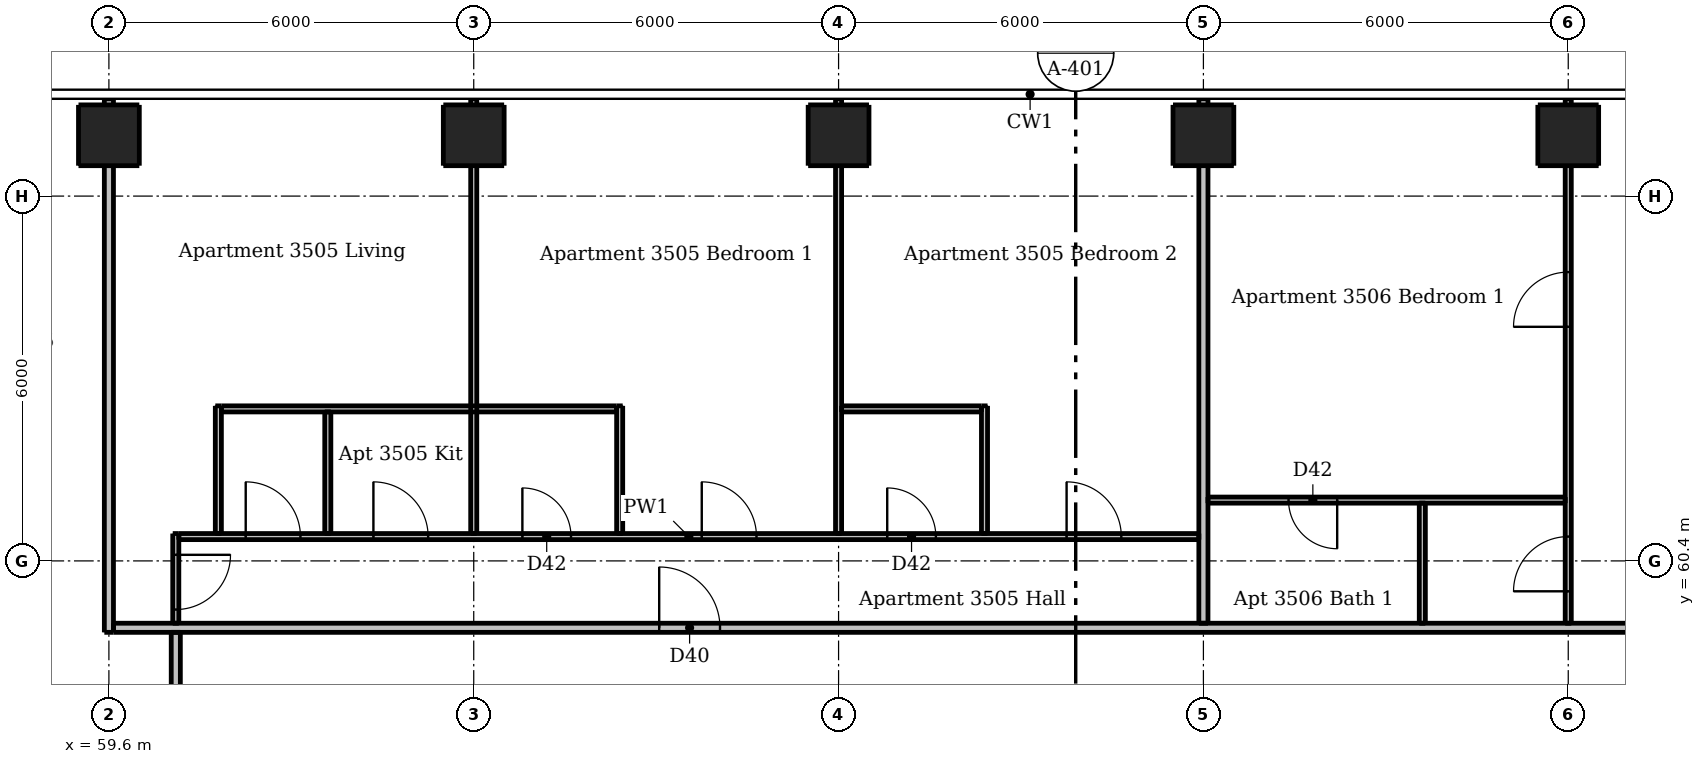
"""IFC4 building model, lengths in metres.
Left out: names, types, materials, properties, quantities, classifications, styles, units other than length and angle.
Written with IfcOpenShell. Run it as: python <this file> out.ifc"""

import sys

from ifc_helpers import new_model, si_unit, direction, frame, frame_2d, origin, origin_2d, place, context, subcontext, project, spatial, rectangle, extrude, element, fill, save


model = new_model("IFC4")
c1 = context("Model", 3, precision=1e-05, world=origin(), true_north=direction((0.0, 1.0)))
c2 = subcontext(c1, "Body", "Model", "MODEL_VIEW")
j1 = project(units=[si_unit("LENGTHUNIT", "METRE"), si_unit("PLANEANGLEUNIT", "RADIAN")], contexts=[c1])
p1 = place(None, origin())
s1 = spatial("IfcSite", under=j1, at=p1, CompositionType="ELEMENT")
p2 = place(p1, origin())
s2 = spatial("IfcBuilding", under=s1, at=p2, CompositionType="ELEMENT")
p3 = place(p2, frame((0.0, 0.0, 133.9)))
s3 = spatial("IfcBuildingStorey", under=s2, at=p3, CompositionType="ELEMENT", Elevation=133.9)
for number, where, z_axis, x_axis in (
    (1, (59.6, 67.4, 0.0), (0.0, 0.0, 1.0), (1.0, 0.0, 0.0)),
    (2, (65.6, 67.4, 0.0), (0.0, 0.0, 1.0), (1.0, 0.0, 0.0)),
    (3, (71.6, 67.4, 0.0), (0.0, 0.0, 1.0), (1.0, 0.0, 0.0)),
    (4, (77.6, 67.4, 0.0), (0.0, 0.0, 1.0), (1.0, 0.0, 0.0)),
    (5, (83.6, 67.4, 0.0), (0.0, 0.0, 1.0), (1.0, 0.0, 0.0)),
):
    element("IfcColumn", number, at=place(p3, frame(where, z_axis=z_axis, x_axis=x_axis)), inside=s3, PredefinedType="COLUMN", context=c2, shape_type="SweptSolid", body=[
        extrude(rectangle(XDim=1.0, YDim=1.0, at=origin_2d()), origin(), (0.0, 0.0, 1.0), 3.05),
    ])
p4 = place(p3, frame((60.7, 60.85, 0.0), z_axis=(0.0, 0.0, 1.0), x_axis=(0.0, -1.0, 0.0)))
e6 = element("IfcWall", 6, at=p4, inside=s3, PredefinedType="PARTITIONING", context=c2, shape_type="SweptSolid", body=[
    extrude(rectangle(XDim=1.475, YDim=0.1, at=frame_2d((0.738, 0.0))), origin(), (0.0, 0.0, 1.0), 3.05),
])
p5 = place(p4, frame((0.35, 0.0, 0.0)))
e7 = element("IfcOpeningElement", 7, at=p5, cuts=e6, PredefinedType="OPENING", context=c2, shape_type="SweptSolid", body=[
    extrude(rectangle(XDim=0.9, YDim=2.1, at=frame_2d((0.45, 1.05))), frame((0.0, 0.06, 0.0), z_axis=(0.0, -1.0, 0.0), x_axis=(1.0, 0.0, 0.0)), (0.0, 0.0, 1.0), 0.12),
])
p6 = place(p3, frame((61.4, 60.85, 0.0), z_axis=(0.0, 0.0, 1.0), x_axis=(0.0, 1.0, 0.0)))
e8 = element("IfcWall", 8, at=p6, inside=s3, PredefinedType="PARTITIONING", context=c2, shape_type="SweptSolid", body=[
    extrude(rectangle(XDim=2.1, YDim=0.1, at=frame_2d((1.05, 0.0))), origin(), (0.0, 0.0, 1.0), 3.05),
])
p7 = place(p3, frame((63.2, 60.85, 0.0), z_axis=(0.0, 0.0, 1.0), x_axis=(0.0, 1.0, 0.0)))
e9 = element("IfcWall", 9, at=p7, inside=s3, PredefinedType="PARTITIONING", context=c2, shape_type="SweptSolid", body=[
    extrude(rectangle(XDim=2.0, YDim=0.1, at=frame_2d((1.0, 0.0))), origin(), (0.0, 0.0, 1.0), 3.05),
])
p8 = place(p3, frame((65.6, 60.85, 0.0), z_axis=(0.0, 0.0, 1.0), x_axis=(0.0, 1.0, 0.0)))
e10 = element("IfcWall", 10, at=p8, inside=s3, PredefinedType="PARTITIONING", context=c2, shape_type="SweptSolid", body=[
    extrude(rectangle(XDim=7.15, YDim=0.1, at=frame_2d((3.575, 0.0))), origin(), (0.0, 0.0, 1.0), 2.516),
])
p9 = place(p3, frame((68.0, 60.85, 0.0), z_axis=(0.0, 0.0, 1.0), x_axis=(0.0, 1.0, 0.0)))
e11 = element("IfcWall", 11, at=p9, inside=s3, PredefinedType="PARTITIONING", context=c2, shape_type="SweptSolid", body=[
    extrude(rectangle(XDim=2.1, YDim=0.1, at=frame_2d((1.05, 0.0))), origin(), (0.0, 0.0, 1.0), 3.05),
])
p10 = place(p3, frame((71.6, 60.85, 0.0), z_axis=(0.0, 0.0, 1.0), x_axis=(0.0, 1.0, 0.0)))
e12 = element("IfcWall", 12, at=p10, inside=s3, PredefinedType="PARTITIONING", context=c2, shape_type="SweptSolid", body=[
    extrude(rectangle(XDim=7.15, YDim=0.1, at=frame_2d((3.575, 0.0))), origin(), (0.0, 0.0, 1.0), 2.516),
])
p11 = place(p3, frame((74.0, 60.85, 0.0), z_axis=(0.0, 0.0, 1.0), x_axis=(0.0, 1.0, 0.0)))
e13 = element("IfcWall", 13, at=p11, inside=s3, PredefinedType="PARTITIONING", context=c2, shape_type="SweptSolid", body=[
    extrude(rectangle(XDim=2.1, YDim=0.1, at=frame_2d((1.05, 0.0))), origin(), (0.0, 0.0, 1.0), 3.05),
])
p12 = place(p3, frame((81.2, 59.375, 0.0), z_axis=(0.0, 0.0, 1.0), x_axis=(0.0, 1.0, 0.0)))
e14 = element("IfcWall", 14, at=p12, inside=s3, PredefinedType="PARTITIONING", context=c2, shape_type="SweptSolid", body=[
    extrude(rectangle(XDim=1.975, YDim=0.1, at=frame_2d((0.988, 0.0))), origin(), (0.0, 0.0, 1.0), 3.05),
])
p13 = place(p3, frame((83.6, 59.375, 0.0), z_axis=(0.0, 0.0, 1.0), x_axis=(0.0, 1.0, 0.0)))
e15 = element("IfcWall", 15, at=p13, inside=s3, PredefinedType="PARTITIONING", context=c2, shape_type="SweptSolid", body=[
    extrude(rectangle(XDim=8.625, YDim=0.1, at=frame_2d((4.312, 0.0))), origin(), (0.0, 0.0, 1.0), 2.516),
])
p14 = place(p13, frame((0.525, 0.0, 0.0)))
e16 = element("IfcOpeningElement", 16, at=p14, cuts=e15, PredefinedType="OPENING", context=c2, shape_type="SweptSolid", body=[
    extrude(rectangle(XDim=0.9, YDim=2.1, at=frame_2d((0.45, 1.05))), frame((0.0, 0.06, 0.0), z_axis=(0.0, -1.0, 0.0), x_axis=(1.0, 0.0, 0.0)), (0.0, 0.0, 1.0), 0.12),
])
p15 = place(p13, frame((4.875, 0.0, 0.0)))
e17 = element("IfcOpeningElement", 17, at=p15, cuts=e15, PredefinedType="OPENING", context=c2, shape_type="SweptSolid", body=[
    extrude(rectangle(XDim=0.9, YDim=2.1, at=frame_2d((0.45, 1.05))), frame((0.0, 0.06, 0.0), z_axis=(0.0, -1.0, 0.0), x_axis=(1.0, 0.0, 0.0)), (0.0, 0.0, 1.0), 0.12),
])
p16 = place(p3, frame((61.45, 62.9, 0.0), z_axis=(0.0, 0.0, 1.0), x_axis=(1.0, 0.0, 0.0)))
e18 = element("IfcWall", 18, at=p16, inside=s3, PredefinedType="PARTITIONING", context=c2, shape_type="SweptSolid", body=[
    extrude(rectangle(XDim=6.5, YDim=0.1, at=frame_2d((3.25, 0.0))), origin(), (0.0, 0.0, 1.0), 3.05),
])
p17 = place(p3, frame((71.65, 62.9, 0.0), z_axis=(0.0, 0.0, 1.0), x_axis=(1.0, 0.0, 0.0)))
e19 = element("IfcWall", 19, at=p17, inside=s3, PredefinedType="PARTITIONING", context=c2, shape_type="SweptSolid", body=[
    extrude(rectangle(XDim=2.3, YDim=0.1, at=frame_2d((1.15, 0.0))), origin(), (0.0, 0.0, 1.0), 3.05),
])
p18 = place(p3, frame((83.55, 61.4, 0.0), z_axis=(0.0, 0.0, 1.0), x_axis=(-1.0, 0.0, 0.0)))
e20 = element("IfcWall", 20, at=p18, inside=s3, PredefinedType="PARTITIONING", context=c2, shape_type="SweptSolid", body=[
    extrude(rectangle(XDim=5.875, YDim=0.1, at=frame_2d((2.938, 0.0))), origin(), (0.0, 0.0, 1.0), 3.05),
])
p19 = place(p18, frame((3.75, 0.0, 0.0)))
e21 = element("IfcOpeningElement", 21, at=p19, cuts=e20, PredefinedType="OPENING", context=c2, shape_type="SweptSolid", body=[
    extrude(rectangle(XDim=0.8, YDim=2.1, at=frame_2d((0.4, 1.05))), frame((0.0, 0.06, 0.0), z_axis=(0.0, -1.0, 0.0), x_axis=(1.0, 0.0, 0.0)), (0.0, 0.0, 1.0), 0.12),
])
p20 = place(p3, frame((60.75, 60.8, 0.0), z_axis=(0.0, 0.0, 1.0), x_axis=(1.0, 0.0, 0.0)))
e22 = element("IfcWall", 22, at=p20, inside=s3, PredefinedType="PARTITIONING", context=c2, shape_type="SweptSolid", body=[
    extrude(rectangle(XDim=16.775, YDim=0.1, at=frame_2d((8.387, 0.0))), origin(), (0.0, 0.0, 1.0), 3.05),
])
p21 = place(p20, frame((3.2, 0.0, 0.0)))
e23 = element("IfcOpeningElement", 23, at=p21, cuts=e22, PredefinedType="OPENING", context=c2, shape_type="SweptSolid", body=[
    extrude(rectangle(XDim=0.9, YDim=2.1, at=frame_2d((0.45, 1.05))), frame((0.0, 0.06, 0.0), z_axis=(0.0, -1.0, 0.0), x_axis=(1.0, 0.0, 0.0)), (0.0, 0.0, 1.0), 0.12),
])
p22 = place(p20, frame((1.1, 0.0, 0.0)))
e24 = element("IfcOpeningElement", 24, at=p22, cuts=e22, PredefinedType="OPENING", context=c2, shape_type="SweptSolid", body=[
    extrude(rectangle(XDim=0.9, YDim=2.1, at=frame_2d((0.45, 1.05))), frame((0.0, 0.06, 0.0), z_axis=(0.0, -1.0, 0.0), x_axis=(1.0, 0.0, 0.0)), (0.0, 0.0, 1.0), 0.12),
])
p23 = place(p20, frame((8.6, 0.0, 0.0)))
e25 = element("IfcOpeningElement", 25, at=p23, cuts=e22, PredefinedType="OPENING", context=c2, shape_type="SweptSolid", body=[
    extrude(rectangle(XDim=0.9, YDim=2.1, at=frame_2d((0.45, 1.05))), frame((0.0, 0.06, 0.0), z_axis=(0.0, -1.0, 0.0), x_axis=(1.0, 0.0, 0.0)), (0.0, 0.0, 1.0), 0.12),
])
p24 = place(p20, frame((14.6, 0.0, 0.0)))
e26 = element("IfcOpeningElement", 26, at=p24, cuts=e22, PredefinedType="OPENING", context=c2, shape_type="SweptSolid", body=[
    extrude(rectangle(XDim=0.9, YDim=2.1, at=frame_2d((0.45, 1.05))), frame((0.0, 0.06, 0.0), z_axis=(0.0, -1.0, 0.0), x_axis=(1.0, 0.0, 0.0)), (0.0, 0.0, 1.0), 0.12),
])
p25 = place(p20, frame((5.65, 0.0, 0.0)))
e27 = element("IfcOpeningElement", 27, at=p25, cuts=e22, PredefinedType="OPENING", context=c2, shape_type="SweptSolid", body=[
    extrude(rectangle(XDim=0.8, YDim=2.1, at=frame_2d((0.4, 1.05))), frame((0.0, 0.06, 0.0), z_axis=(0.0, -1.0, 0.0), x_axis=(1.0, 0.0, 0.0)), (0.0, 0.0, 1.0), 0.12),
])
p26 = place(p20, frame((11.65, 0.0, 0.0)))
e28 = element("IfcOpeningElement", 28, at=p26, cuts=e22, PredefinedType="OPENING", context=c2, shape_type="SweptSolid", body=[
    extrude(rectangle(XDim=0.8, YDim=2.1, at=frame_2d((0.4, 1.05))), frame((0.0, 0.06, 0.0), z_axis=(0.0, -1.0, 0.0), x_axis=(1.0, 0.0, 0.0)), (0.0, 0.0, 1.0), 0.12),
])
p27 = place(p3, frame((59.6, 59.225, 0.0), z_axis=(0.0, 0.0, 1.0), x_axis=(0.0, 1.0, 0.0)))
e29 = element("IfcWall", 29, at=p27, inside=s3, PredefinedType="PARTITIONING", context=c2, shape_type="SweptSolid", body=[
    extrude(rectangle(XDim=8.775, YDim=0.15, at=frame_2d((4.387, 0.0))), origin(), (0.0, 0.0, 1.0), 2.51),
])
p28 = place(p3, frame((60.7, 30.325, 0.0), z_axis=(0.0, 0.0, 1.0), x_axis=(0.0, 1.0, 0.0)))
e30 = element("IfcWall", 30, at=p28, inside=s3, PredefinedType="PARTITIONING", context=c2, shape_type="SweptSolid", body=[
    extrude(rectangle(XDim=28.9, YDim=0.15, at=frame_2d((14.45, 0.0))), origin(), (0.0, 0.0, 1.0), 3.05),
])
p29 = place(p28, frame((9.225, 0.0, 0.0)))
e31 = element("IfcOpeningElement", 31, at=p29, cuts=e30, PredefinedType="OPENING", context=c2, shape_type="SweptSolid", body=[
    extrude(rectangle(XDim=1.0, YDim=2.1, at=frame_2d((0.5, 1.05))), frame((0.0, 0.085, 0.0), z_axis=(0.0, -1.0, 0.0), x_axis=(1.0, 0.0, 0.0)), (0.0, 0.0, 1.0), 0.17),
])
p30 = place(p28, frame((26.025, 0.0, 0.0)))
e32 = element("IfcOpeningElement", 32, at=p30, cuts=e30, PredefinedType="OPENING", context=c2, shape_type="SweptSolid", body=[
    extrude(rectangle(XDim=1.0, YDim=2.1, at=frame_2d((0.5, 1.05))), frame((0.0, 0.085, 0.0), z_axis=(0.0, -1.0, 0.0), x_axis=(1.0, 0.0, 0.0)), (0.0, 0.0, 1.0), 0.17),
])
p31 = place(p3, frame((77.6, 59.375, 0.0), z_axis=(0.0, 0.0, 1.0), x_axis=(0.0, 1.0, 0.0)))
e33 = element("IfcWall", 33, at=p31, inside=s3, PredefinedType="PARTITIONING", context=c2, shape_type="SweptSolid", body=[
    extrude(rectangle(XDim=8.625, YDim=0.15, at=frame_2d((4.312, 0.0))), origin(), (0.0, 0.0, 1.0), 2.516),
])
p32 = place(p3, frame((59.675, 59.3, 0.0), z_axis=(0.0, 0.0, 1.0), x_axis=(1.0, 0.0, 0.0)))
e34 = element("IfcWall", 34, at=p32, inside=s3, PredefinedType="PARTITIONING", context=c2, shape_type="SweptSolid", body=[
    extrude(rectangle(XDim=28.55, YDim=0.15, at=frame_2d((14.275, 0.0))), origin(), (0.0, 0.0, 1.0), 3.05),
])
p33 = place(p32, frame((8.975, 0.0, 0.0)))
e35 = element("IfcOpeningElement", 35, at=p33, cuts=e34, PredefinedType="OPENING", context=c2, shape_type="SweptSolid", body=[
    extrude(rectangle(XDim=1.0, YDim=2.1, at=frame_2d((0.5, 1.05))), frame((0.0, 0.085, 0.0), z_axis=(0.0, -1.0, 0.0), x_axis=(1.0, 0.0, 0.0)), (0.0, 0.0, 1.0), 0.17),
])
p34 = place(p32, frame((25.775, 0.0, 0.0)))
e36 = element("IfcOpeningElement", 36, at=p34, cuts=e34, PredefinedType="OPENING", context=c2, shape_type="SweptSolid", body=[
    extrude(rectangle(XDim=1.0, YDim=2.1, at=frame_2d((0.5, 1.05))), frame((0.0, 0.085, 0.0), z_axis=(0.0, -1.0, 0.0), x_axis=(1.0, 0.0, 0.0)), (0.0, 0.0, 1.0), 0.17),
])
p35 = place(p33, origin())
e37 = element("IfcDoor", 37, at=p35, inside=s3, OperationType="SINGLE_SWING_LEFT", PredefinedType="DOOR", context=c2, shape_type="SweptSolid", body=[
    extrude(rectangle(XDim=1.0, YDim=2.1, at=frame_2d((0.5, 1.05))), frame((0.0, 0.025, 0.0), z_axis=(0.0, -1.0, 0.0), x_axis=(1.0, 0.0, 0.0)), (0.0, 0.0, 1.0), 0.05),
])
fill(e35, e37)
p36 = place(p5, origin())
e38 = element("IfcDoor", 38, at=p36, inside=s3, OperationType="SINGLE_SWING_LEFT", PredefinedType="DOOR", context=c2, shape_type="SweptSolid", body=[
    extrude(rectangle(XDim=0.9, YDim=2.1, at=frame_2d((0.45, 1.05))), frame((0.0, 0.025, 0.0), z_axis=(0.0, -1.0, 0.0), x_axis=(1.0, 0.0, 0.0)), (0.0, 0.0, 1.0), 0.05),
])
fill(e7, e38)
p37 = place(p21, origin())
e39 = element("IfcDoor", 39, at=p37, inside=s3, OperationType="SINGLE_SWING_LEFT", PredefinedType="DOOR", context=c2, shape_type="SweptSolid", body=[
    extrude(rectangle(XDim=0.9, YDim=2.1, at=frame_2d((0.45, 1.05))), frame((0.0, 0.025, 0.0), z_axis=(0.0, -1.0, 0.0), x_axis=(1.0, 0.0, 0.0)), (0.0, 0.0, 1.0), 0.05),
])
fill(e23, e39)
p38 = place(p22, origin())
e40 = element("IfcDoor", 40, at=p38, inside=s3, OperationType="SINGLE_SWING_LEFT", PredefinedType="DOOR", context=c2, shape_type="SweptSolid", body=[
    extrude(rectangle(XDim=0.9, YDim=2.1, at=frame_2d((0.45, 1.05))), frame((0.0, 0.025, 0.0), z_axis=(0.0, -1.0, 0.0), x_axis=(1.0, 0.0, 0.0)), (0.0, 0.0, 1.0), 0.05),
])
fill(e24, e40)
p39 = place(p23, origin())
e41 = element("IfcDoor", 41, at=p39, inside=s3, OperationType="SINGLE_SWING_LEFT", PredefinedType="DOOR", context=c2, shape_type="SweptSolid", body=[
    extrude(rectangle(XDim=0.9, YDim=2.1, at=frame_2d((0.45, 1.05))), frame((0.0, 0.025, 0.0), z_axis=(0.0, -1.0, 0.0), x_axis=(1.0, 0.0, 0.0)), (0.0, 0.0, 1.0), 0.05),
])
fill(e25, e41)
p40 = place(p24, origin())
e42 = element("IfcDoor", 42, at=p40, inside=s3, OperationType="SINGLE_SWING_LEFT", PredefinedType="DOOR", context=c2, shape_type="SweptSolid", body=[
    extrude(rectangle(XDim=0.9, YDim=2.1, at=frame_2d((0.45, 1.05))), frame((0.0, 0.025, 0.0), z_axis=(0.0, -1.0, 0.0), x_axis=(1.0, 0.0, 0.0)), (0.0, 0.0, 1.0), 0.05),
])
fill(e26, e42)
p41 = place(p25, origin())
e43 = element("IfcDoor", 43, at=p41, inside=s3, OperationType="SINGLE_SWING_LEFT", PredefinedType="DOOR", context=c2, shape_type="SweptSolid", body=[
    extrude(rectangle(XDim=0.8, YDim=2.1, at=frame_2d((0.4, 1.05))), frame((0.0, 0.025, 0.0), z_axis=(0.0, -1.0, 0.0), x_axis=(1.0, 0.0, 0.0)), (0.0, 0.0, 1.0), 0.05),
])
fill(e27, e43)
p42 = place(p26, origin())
e44 = element("IfcDoor", 44, at=p42, inside=s3, OperationType="SINGLE_SWING_LEFT", PredefinedType="DOOR", context=c2, shape_type="SweptSolid", body=[
    extrude(rectangle(XDim=0.8, YDim=2.1, at=frame_2d((0.4, 1.05))), frame((0.0, 0.025, 0.0), z_axis=(0.0, -1.0, 0.0), x_axis=(1.0, 0.0, 0.0)), (0.0, 0.0, 1.0), 0.05),
])
fill(e28, e44)
p43 = place(p14, origin())
e45 = element("IfcDoor", 45, at=p43, inside=s3, OperationType="SINGLE_SWING_LEFT", PredefinedType="DOOR", context=c2, shape_type="SweptSolid", body=[
    extrude(rectangle(XDim=0.9, YDim=2.1, at=frame_2d((0.45, 1.05))), frame((0.0, 0.025, 0.0), z_axis=(0.0, -1.0, 0.0), x_axis=(1.0, 0.0, 0.0)), (0.0, 0.0, 1.0), 0.05),
])
fill(e16, e45)
p44 = place(p15, origin())
e46 = element("IfcDoor", 46, at=p44, inside=s3, OperationType="SINGLE_SWING_LEFT", PredefinedType="DOOR", context=c2, shape_type="SweptSolid", body=[
    extrude(rectangle(XDim=0.9, YDim=2.1, at=frame_2d((0.45, 1.05))), frame((0.0, 0.025, 0.0), z_axis=(0.0, -1.0, 0.0), x_axis=(1.0, 0.0, 0.0)), (0.0, 0.0, 1.0), 0.05),
])
fill(e17, e46)
p45 = place(p19, origin())
e47 = element("IfcDoor", 47, at=p45, inside=s3, OperationType="SINGLE_SWING_LEFT", PredefinedType="DOOR", context=c2, shape_type="SweptSolid", body=[
    extrude(rectangle(XDim=0.8, YDim=2.1, at=frame_2d((0.4, 1.05))), frame((0.0, 0.025, 0.0), z_axis=(0.0, -1.0, 0.0), x_axis=(1.0, 0.0, 0.0)), (0.0, 0.0, 1.0), 0.05),
])
fill(e21, e47)
save(model, sys.argv[1])
